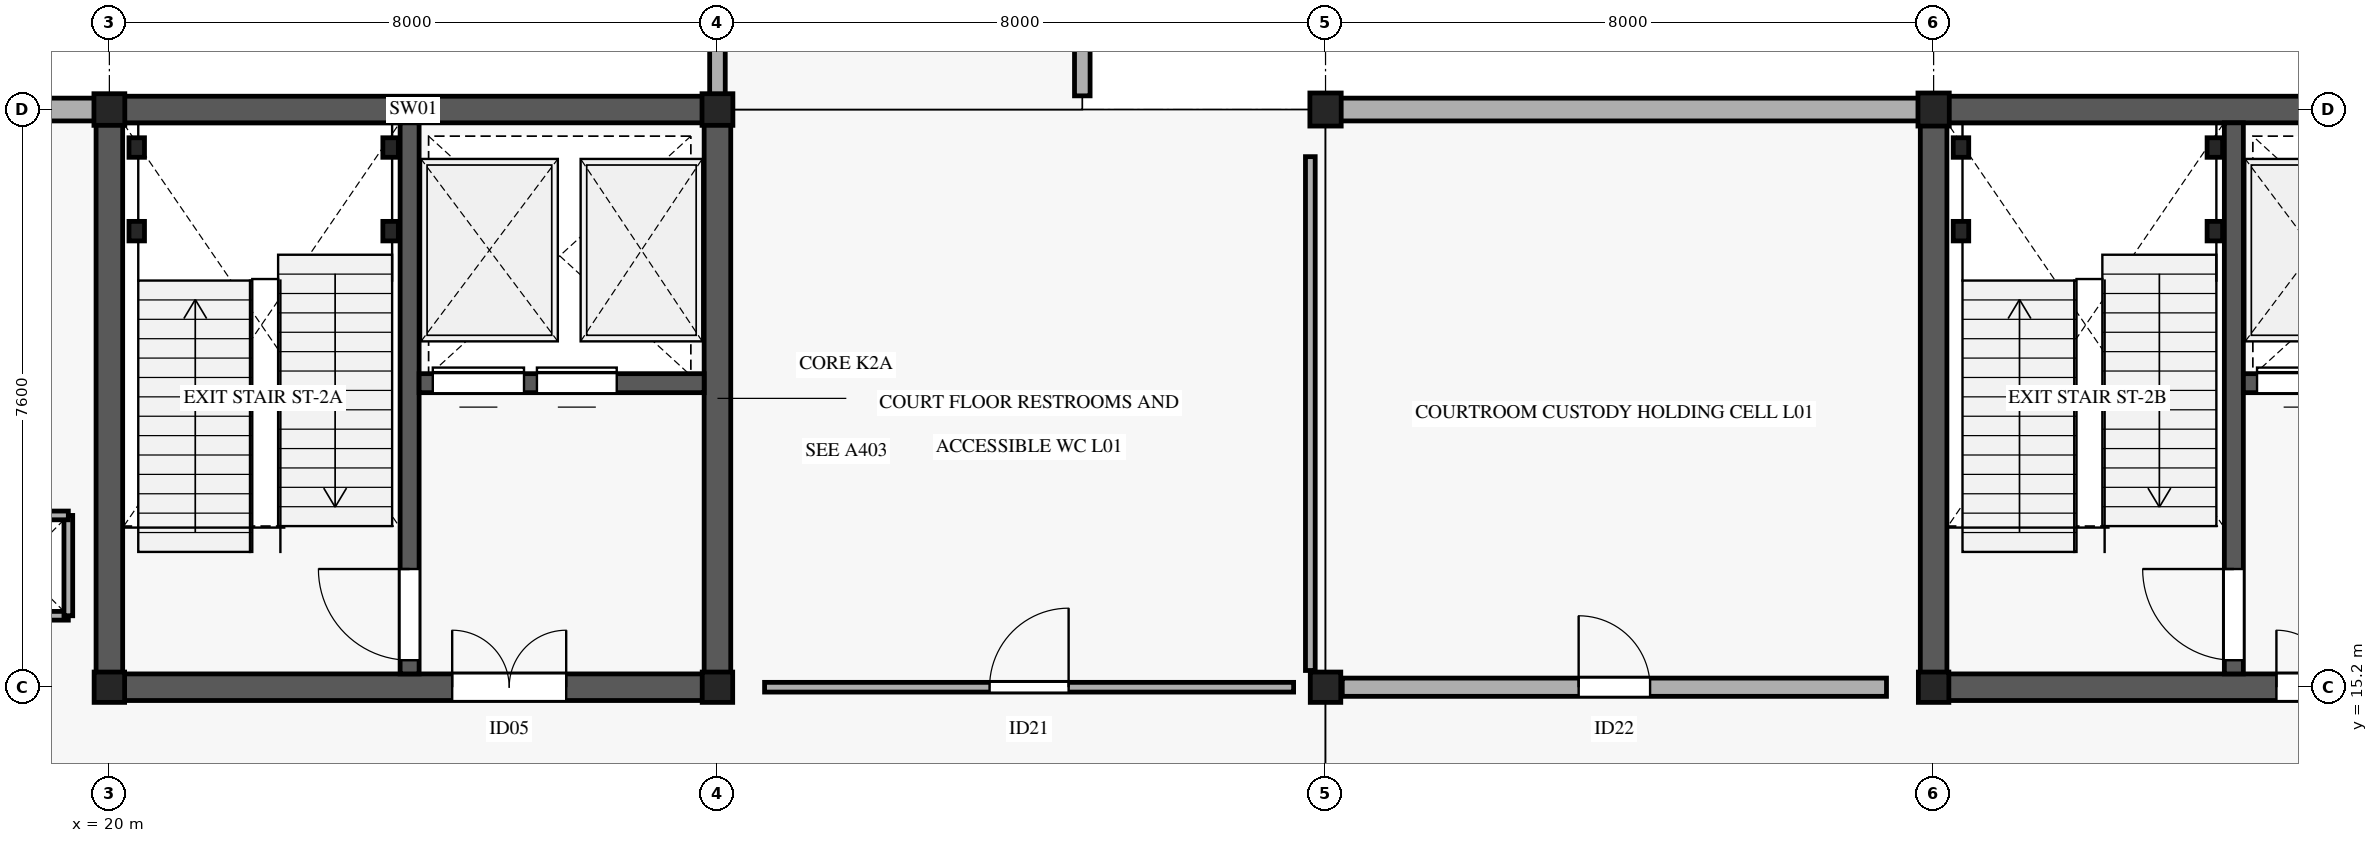
"""IFC4 building model, lengths in metres.
Left out: names, types, materials, properties, quantities, classifications, styles, units other than length and angle.
Written with IfcOpenShell. Run it as: python <this file> out.ifc"""

import sys

from ifc_helpers import new_model, si_unit, direction, frame, frame_2d, origin, origin_2d, place, context, subcontext, project, spatial, rectangle, i_section, extrude, element, fill, save


model = new_model("IFC4")
c1 = context("Model", 3, precision=1e-05, world=origin(), true_north=direction((0.0, 1.0)))
c2 = subcontext(c1, "Body", "Model", "MODEL_VIEW")
j1 = project(units=[si_unit("LENGTHUNIT", "METRE"), si_unit("PLANEANGLEUNIT", "RADIAN")], contexts=[c1])
p1 = place(None, origin())
s1 = spatial("IfcSite", under=j1, at=p1, CompositionType="ELEMENT")
p2 = place(p1, origin())
s2 = spatial("IfcBuilding", under=s1, at=p2, CompositionType="ELEMENT")
p3 = place(p2, frame((0.0, 0.0, 5.4)))
s3 = spatial("IfcBuildingStorey", under=s2, at=p3, CompositionType="ELEMENT", Elevation=5.4)
p4 = place(p3, frame((20.0, 15.2, 0.0), z_axis=(0.0, 0.0, 1.0), x_axis=(1.0, 0.0, 0.0)))
e1 = element("IfcColumn", 1, at=p4, inside=s3, PredefinedType="COLUMN", context=c2, shape_type="SweptSolid", body=[
    extrude(i_section(OverallWidth=0.401, OverallDepth=0.399, WebThickness=0.025, FlangeThickness=0.04, FilletRadius=0.015, at=origin_2d()), origin(), (0.0, 0.0, 1.0), 5.185),
])
p5 = place(p3, frame((20.0, 22.8, 0.0), z_axis=(0.0, 0.0, 1.0), x_axis=(1.0, 0.0, 0.0)))
e2 = element("IfcColumn", 2, at=p5, inside=s3, PredefinedType="COLUMN", context=c2, shape_type="SweptSolid", body=[
    extrude(i_section(OverallWidth=0.406, OverallDepth=0.416, WebThickness=0.03, FlangeThickness=0.048, FilletRadius=0.015, at=origin_2d()), origin(), (0.0, 0.0, 1.0), 5.185),
])
p6 = place(p3, frame((28.0, 15.2, 0.0), z_axis=(0.0, 0.0, 1.0), x_axis=(1.0, 0.0, 0.0)))
e3 = element("IfcColumn", 3, at=p6, inside=s3, PredefinedType="COLUMN", context=c2, shape_type="SweptSolid", body=[
    extrude(i_section(OverallWidth=0.401, OverallDepth=0.399, WebThickness=0.025, FlangeThickness=0.04, FilletRadius=0.015, at=origin_2d()), origin(), (0.0, 0.0, 1.0), 5.185),
])
p7 = place(p3, frame((28.0, 22.8, 0.0), z_axis=(0.0, 0.0, 1.0), x_axis=(1.0, 0.0, 0.0)))
e4 = element("IfcColumn", 4, at=p7, inside=s3, PredefinedType="COLUMN", context=c2, shape_type="SweptSolid", body=[
    extrude(i_section(OverallWidth=0.406, OverallDepth=0.416, WebThickness=0.03, FlangeThickness=0.048, FilletRadius=0.015, at=origin_2d()), origin(), (0.0, 0.0, 1.0), 5.185),
])
p8 = place(p3, frame((36.0, 15.2, 0.0), z_axis=(0.0, 0.0, 1.0), x_axis=(1.0, 0.0, 0.0)))
e5 = element("IfcColumn", 5, at=p8, inside=s3, PredefinedType="COLUMN", context=c2, shape_type="SweptSolid", body=[
    extrude(i_section(OverallWidth=0.401, OverallDepth=0.399, WebThickness=0.025, FlangeThickness=0.04, FilletRadius=0.015, at=origin_2d()), origin(), (0.0, 0.0, 1.0), 5.185),
])
p9 = place(p3, frame((36.0, 22.8, 0.0), z_axis=(0.0, 0.0, 1.0), x_axis=(1.0, 0.0, 0.0)))
e6 = element("IfcColumn", 6, at=p9, inside=s3, PredefinedType="COLUMN", context=c2, shape_type="SweptSolid", body=[
    extrude(i_section(OverallWidth=0.412, OverallDepth=0.435, WebThickness=0.036, FlangeThickness=0.057, FilletRadius=0.015, at=origin_2d()), origin(), (0.0, 0.0, 1.0), 5.185),
])
p10 = place(p3, frame((44.0, 15.2, 0.0), z_axis=(0.0, 0.0, 1.0), x_axis=(1.0, 0.0, 0.0)))
e7 = element("IfcColumn", 7, at=p10, inside=s3, PredefinedType="COLUMN", context=c2, shape_type="SweptSolid", body=[
    extrude(i_section(OverallWidth=0.401, OverallDepth=0.399, WebThickness=0.025, FlangeThickness=0.04, FilletRadius=0.015, at=origin_2d()), origin(), (0.0, 0.0, 1.0), 5.185),
])
p11 = place(p3, frame((44.0, 22.8, 0.0), z_axis=(0.0, 0.0, 1.0), x_axis=(1.0, 0.0, 0.0)))
e8 = element("IfcColumn", 8, at=p11, inside=s3, PredefinedType="COLUMN", context=c2, shape_type="SweptSolid", body=[
    extrude(i_section(OverallWidth=0.412, OverallDepth=0.435, WebThickness=0.036, FlangeThickness=0.057, FilletRadius=0.015, at=origin_2d()), origin(), (0.0, 0.0, 1.0), 5.185),
])
for number, where, z_axis, x_axis in (
    (9, (11.98, 22.8, 0.0), (0.0, 0.0, 1.0), (1.0, 0.0, 0.0)),
    (10, (35.98, 22.8, 0.0), (0.0, 0.0, 1.0), (1.0, 0.0, 0.0)),
):
    element("IfcWall", number, at=place(p3, frame(where, z_axis=z_axis, x_axis=x_axis)), inside=s3, PredefinedType="STANDARD", context=c2, shape_type="SweptSolid", body=[
        extrude(rectangle(XDim=8.04, YDim=0.3, at=frame_2d((4.02, 0.0))), origin(), (0.0, 0.0, 1.0), 4.25),
    ])
p12 = place(p3, frame((28.0, 22.98, 0.0), z_axis=(0.0, 0.0, 1.0), x_axis=(0.0, 1.0, 0.0)))
e11 = element("IfcWall", 11, at=p12, inside=s3, PredefinedType="STANDARD", context=c2, shape_type="SweptSolid", body=[
    extrude(rectangle(XDim=22.84, YDim=0.205, at=frame_2d((11.42, 0.0))), origin(), (0.0, 0.0, 1.0), 4.62),
])
p13 = place(p12, frame((10.195, 0.0, 0.85)))
e12 = element("IfcOpeningElement", 12, at=p13, cuts=e11, PredefinedType="OPENING", context=c2, shape_type="SweptSolid", body=[
    extrude(rectangle(XDim=2.45, YDim=1.55, at=frame_2d((1.225, 0.775))), frame((0.0, 0.113, 0.0), z_axis=(0.0, -1.0, 0.0), x_axis=(1.0, 0.0, 0.0)), (0.0, 0.0, 1.0), 0.225),
])
p14 = place(p3, frame((32.8, 45.82, 0.0), z_axis=(0.0, 0.0, 1.0), x_axis=(0.0, -1.0, 0.0)))
e13 = element("IfcWall", 13, at=p14, inside=s3, PredefinedType="STANDARD", context=c2, shape_type="SweptSolid", body=[
    extrude(rectangle(XDim=22.84, YDim=0.205, at=frame_2d((11.42, 0.0))), origin(), (0.0, 0.0, 1.0), 4.62),
])
p15 = place(p14, frame((10.195, 0.0, 0.85)))
e14 = element("IfcOpeningElement", 14, at=p15, cuts=e13, PredefinedType="OPENING", context=c2, shape_type="SweptSolid", body=[
    extrude(rectangle(XDim=2.45, YDim=1.55, at=frame_2d((1.225, 0.775))), frame((0.0, 0.113, 0.0), z_axis=(0.0, -1.0, 0.0), x_axis=(1.0, 0.0, 0.0)), (0.0, 0.0, 1.0), 0.225),
])
for number, where, z_axis, x_axis in (
    (15, (18.14, 16.14, 0.0), (0.0, 0.0, 1.0), (1.0, 0.0, 0.0)),
    (16, (19.46, 16.14, 0.0), (0.0, 0.0, 1.0), (0.0, 1.0, 0.0)),
    (17, (19.46, 17.46, 0.0), (0.0, 0.0, 1.0), (-1.0, 0.0, 0.0)),
):
    element("IfcWall", number, at=place(p3, frame(where, z_axis=z_axis, x_axis=x_axis)), inside=s3, PredefinedType="PARTITIONING", context=c2, shape_type="SweptSolid", body=[
        extrude(rectangle(XDim=1.32, YDim=0.115, at=frame_2d((0.66, 0.0))), origin(), (0.0, 0.0, 1.0), 4.35),
    ])
p16 = place(p3, frame((19.825, 15.2, 0.0), z_axis=(0.0, 0.0, 1.0), x_axis=(1.0, 0.0, 0.0)))
e18 = element("IfcWall", 18, at=p16, inside=s3, PredefinedType="SHEAR", context=c2, shape_type="SweptSolid", body=[
    extrude(rectangle(XDim=8.35, YDim=0.35, at=frame_2d((4.175, 0.0))), origin(), (0.0, 0.0, 1.0), 5.19),
])
p17 = place(p16, frame((4.685, 0.0, 0.0)))
e19 = element("IfcOpeningElement", 19, at=p17, cuts=e18, PredefinedType="OPENING", context=c2, shape_type="SweptSolid", body=[
    extrude(rectangle(XDim=1.5, YDim=2.2, at=frame_2d((0.75, 1.1))), frame((0.0, 0.185, 0.0), z_axis=(0.0, -1.0, 0.0), x_axis=(1.0, 0.0, 0.0)), (0.0, 0.0, 1.0), 0.37),
])
p18 = place(p3, frame((19.825, 22.8, 0.0), z_axis=(0.0, 0.0, 1.0), x_axis=(1.0, 0.0, 0.0)))
e20 = element("IfcWall", 20, at=p18, inside=s3, PredefinedType="SHEAR", context=c2, shape_type="SweptSolid", body=[
    extrude(rectangle(XDim=8.35, YDim=0.35, at=frame_2d((4.175, 0.0))), origin(), (0.0, 0.0, 1.0), 5.19),
])
for number, where, z_axis, x_axis in (
    (21, (20.0, 15.375, 0.0), (0.0, 0.0, 1.0), (0.0, 1.0, 0.0)),
    (22, (28.0, 15.375, 0.0), (0.0, 0.0, 1.0), (0.0, 1.0, 0.0)),
):
    element("IfcWall", number, at=place(p3, frame(where, z_axis=z_axis, x_axis=x_axis)), inside=s3, PredefinedType="SHEAR", context=c2, shape_type="SweptSolid", body=[
        extrude(rectangle(XDim=7.25, YDim=0.35, at=frame_2d((3.625, 0.0))), origin(), (0.0, 0.0, 1.0), 5.19),
    ])
p19 = place(p3, frame((23.95, 15.375, 0.0), z_axis=(0.0, 0.0, 1.0), x_axis=(0.0, 1.0, 0.0)))
e23 = element("IfcWall", 23, at=p19, inside=s3, PredefinedType="SHEAR", context=c2, shape_type="SweptSolid", body=[
    extrude(rectangle(XDim=7.25, YDim=0.25, at=frame_2d((3.625, 0.0))), origin(), (0.0, 0.0, 1.0), 5.19),
])
p20 = place(p19, frame((0.18, 0.0, 0.0)))
e24 = element("IfcOpeningElement", 24, at=p20, cuts=e23, PredefinedType="OPENING", context=c2, shape_type="SweptSolid", body=[
    extrude(rectangle(XDim=1.2, YDim=2.2, at=frame_2d((0.6, 1.1))), frame((0.0, 0.135, 0.0), z_axis=(0.0, -1.0, 0.0), x_axis=(1.0, 0.0, 0.0)), (0.0, 0.0, 1.0), 0.27),
])
p21 = place(p3, frame((24.075, 19.2, 0.0), z_axis=(0.0, 0.0, 1.0), x_axis=(1.0, 0.0, 0.0)))
e25 = element("IfcWall", 25, at=p21, inside=s3, PredefinedType="SHEAR", context=c2, shape_type="SweptSolid", body=[
    extrude(rectangle(XDim=3.75, YDim=0.25, at=frame_2d((1.875, 0.0))), origin(), (0.0, 0.0, 1.0), 5.19),
])
p22 = place(p21, frame((0.18, 0.0, 0.0)))
e26 = element("IfcOpeningElement", 26, at=p22, cuts=e25, PredefinedType="OPENING", context=c2, shape_type="SweptSolid", body=[
    extrude(rectangle(XDim=1.2, YDim=2.2, at=frame_2d((0.6, 1.1))), frame((0.0, 0.135, 0.0), z_axis=(0.0, -1.0, 0.0), x_axis=(1.0, 0.0, 0.0)), (0.0, 0.0, 1.0), 0.27),
])
p23 = place(p21, frame((1.55, 0.0, 0.0)))
e27 = element("IfcOpeningElement", 27, at=p23, cuts=e25, PredefinedType="OPENING", context=c2, shape_type="SweptSolid", body=[
    extrude(rectangle(XDim=1.05, YDim=2.2, at=frame_2d((0.525, 1.1))), frame((0.0, 0.135, 0.0), z_axis=(0.0, -1.0, 0.0), x_axis=(1.0, 0.0, 0.0)), (0.0, 0.0, 1.0), 0.27),
])
for number, where, z_axis, x_axis in (
    (28, (20.36, 21.2, 0.0), (0.0, 0.0, 1.0), (1.0, 0.0, 0.0)),
    (29, (23.7, 21.2, 0.0), (0.0, 0.0, 1.0), (1.0, 0.0, 0.0)),
    (30, (20.36, 22.3, 0.0), (0.0, 0.0, 1.0), (1.0, 0.0, 0.0)),
    (31, (23.7, 22.3, 0.0), (0.0, 0.0, 1.0), (1.0, 0.0, 0.0)),
):
    element("IfcColumn", number, at=place(p3, frame(where, z_axis=z_axis, x_axis=x_axis)), inside=s3, PredefinedType="COLUMN", context=c2, shape_type="SweptSolid", body=[
        extrude(i_section(OverallWidth=0.204, OverallDepth=0.257, WebThickness=0.009, FlangeThickness=0.016, FilletRadius=0.013, at=origin_2d()), origin(), (0.0, 0.0, 1.0), 5.395),
    ])
p24 = place(p3, frame((43.825, 15.2, 0.0), z_axis=(0.0, 0.0, 1.0), x_axis=(1.0, 0.0, 0.0)))
e32 = element("IfcWall", 32, at=p24, inside=s3, PredefinedType="SHEAR", context=c2, shape_type="SweptSolid", body=[
    extrude(rectangle(XDim=8.35, YDim=0.35, at=frame_2d((4.175, 0.0))), origin(), (0.0, 0.0, 1.0), 5.19),
])
p25 = place(p24, frame((4.685, 0.0, 0.0)))
e33 = element("IfcOpeningElement", 33, at=p25, cuts=e32, PredefinedType="OPENING", context=c2, shape_type="SweptSolid", body=[
    extrude(rectangle(XDim=1.5, YDim=2.2, at=frame_2d((0.75, 1.1))), frame((0.0, 0.185, 0.0), z_axis=(0.0, -1.0, 0.0), x_axis=(1.0, 0.0, 0.0)), (0.0, 0.0, 1.0), 0.37),
])
p26 = place(p3, frame((43.825, 22.8, 0.0), z_axis=(0.0, 0.0, 1.0), x_axis=(1.0, 0.0, 0.0)))
e34 = element("IfcWall", 34, at=p26, inside=s3, PredefinedType="SHEAR", context=c2, shape_type="SweptSolid", body=[
    extrude(rectangle(XDim=8.35, YDim=0.35, at=frame_2d((4.175, 0.0))), origin(), (0.0, 0.0, 1.0), 5.19),
])
p27 = place(p3, frame((44.0, 15.375, 0.0), z_axis=(0.0, 0.0, 1.0), x_axis=(0.0, 1.0, 0.0)))
e35 = element("IfcWall", 35, at=p27, inside=s3, PredefinedType="SHEAR", context=c2, shape_type="SweptSolid", body=[
    extrude(rectangle(XDim=7.25, YDim=0.35, at=frame_2d((3.625, 0.0))), origin(), (0.0, 0.0, 1.0), 5.19),
])
p28 = place(p3, frame((47.95, 15.375, 0.0), z_axis=(0.0, 0.0, 1.0), x_axis=(0.0, 1.0, 0.0)))
e36 = element("IfcWall", 36, at=p28, inside=s3, PredefinedType="SHEAR", context=c2, shape_type="SweptSolid", body=[
    extrude(rectangle(XDim=7.25, YDim=0.25, at=frame_2d((3.625, 0.0))), origin(), (0.0, 0.0, 1.0), 5.19),
])
p29 = place(p28, frame((0.18, 0.0, 0.0)))
e37 = element("IfcOpeningElement", 37, at=p29, cuts=e36, PredefinedType="OPENING", context=c2, shape_type="SweptSolid", body=[
    extrude(rectangle(XDim=1.2, YDim=2.2, at=frame_2d((0.6, 1.1))), frame((0.0, 0.135, 0.0), z_axis=(0.0, -1.0, 0.0), x_axis=(1.0, 0.0, 0.0)), (0.0, 0.0, 1.0), 0.27),
])
p30 = place(p3, frame((48.075, 19.2, 0.0), z_axis=(0.0, 0.0, 1.0), x_axis=(1.0, 0.0, 0.0)))
e38 = element("IfcWall", 38, at=p30, inside=s3, PredefinedType="SHEAR", context=c2, shape_type="SweptSolid", body=[
    extrude(rectangle(XDim=3.75, YDim=0.25, at=frame_2d((1.875, 0.0))), origin(), (0.0, 0.0, 1.0), 5.19),
])
p31 = place(p30, frame((0.18, 0.0, 0.0)))
e39 = element("IfcOpeningElement", 39, at=p31, cuts=e38, PredefinedType="OPENING", context=c2, shape_type="SweptSolid", body=[
    extrude(rectangle(XDim=1.2, YDim=2.2, at=frame_2d((0.6, 1.1))), frame((0.0, 0.135, 0.0), z_axis=(0.0, -1.0, 0.0), x_axis=(1.0, 0.0, 0.0)), (0.0, 0.0, 1.0), 0.27),
])
p32 = place(p30, frame((1.85, 0.0, 0.0)))
e40 = element("IfcOpeningElement", 40, at=p32, cuts=e38, PredefinedType="OPENING", context=c2, shape_type="SweptSolid", body=[
    extrude(rectangle(XDim=1.35, YDim=2.2, at=frame_2d((0.675, 1.1))), frame((0.0, 0.135, 0.0), z_axis=(0.0, -1.0, 0.0), x_axis=(1.0, 0.0, 0.0)), (0.0, 0.0, 1.0), 0.27),
])
for number, where, z_axis, x_axis in (
    (41, (44.36, 21.2, 0.0), (0.0, 0.0, 1.0), (1.0, 0.0, 0.0)),
    (42, (47.7, 21.2, 0.0), (0.0, 0.0, 1.0), (1.0, 0.0, 0.0)),
    (43, (44.36, 22.3, 0.0), (0.0, 0.0, 1.0), (1.0, 0.0, 0.0)),
    (44, (47.7, 22.3, 0.0), (0.0, 0.0, 1.0), (1.0, 0.0, 0.0)),
):
    element("IfcColumn", number, at=place(p3, frame(where, z_axis=z_axis, x_axis=x_axis)), inside=s3, PredefinedType="COLUMN", context=c2, shape_type="SweptSolid", body=[
        extrude(i_section(OverallWidth=0.204, OverallDepth=0.257, WebThickness=0.009, FlangeThickness=0.016, FilletRadius=0.013, at=origin_2d()), origin(), (0.0, 0.0, 1.0), 5.395),
    ])
p33 = place(p3, frame((28.62, 15.2, 0.0), z_axis=(0.0, 0.0, 1.0), x_axis=(1.0, 0.0, 0.0)))
e45 = element("IfcWall", 45, at=p33, inside=s3, PredefinedType="PARTITIONING", context=c2, shape_type="SweptSolid", body=[
    extrude(rectangle(XDim=6.96, YDim=0.128, at=frame_2d((3.48, 0.0))), origin(), (0.0, 0.0, 1.0), 4.05),
])
p34 = place(p33, frame((2.96, 0.0, 0.0)))
e46 = element("IfcOpeningElement", 46, at=p34, cuts=e45, PredefinedType="OPENING", context=c2, shape_type="SweptSolid", body=[
    extrude(rectangle(XDim=1.04, YDim=2.2, at=frame_2d((0.52, 1.1))), frame((0.0, 0.074, 0.0), z_axis=(0.0, -1.0, 0.0), x_axis=(1.0, 0.0, 0.0)), (0.0, 0.0, 1.0), 0.148),
])
p35 = place(p3, frame((35.8, 15.42, 0.0), z_axis=(0.0, 0.0, 1.0), x_axis=(0.0, 1.0, 0.0)))
e47 = element("IfcWall", 47, at=p35, inside=s3, PredefinedType="PARTITIONING", context=c2, shape_type="SweptSolid", body=[
    extrude(rectangle(XDim=6.76, YDim=0.128, at=frame_2d((3.38, 0.0))), origin(), (0.0, 0.0, 1.0), 4.05),
])
p36 = place(p3, frame((36.22, 15.2, 0.0), z_axis=(0.0, 0.0, 1.0), x_axis=(1.0, 0.0, 0.0)))
e48 = element("IfcWall", 48, at=p36, inside=s3, PredefinedType="PARTITIONING", context=c2, shape_type="SweptSolid", body=[
    extrude(rectangle(XDim=7.16, YDim=0.24, at=frame_2d((3.58, 0.0))), origin(), (0.0, 0.0, 1.0), 4.05),
])
p37 = place(p36, frame((3.11, 0.0, 0.0)))
e49 = element("IfcOpeningElement", 49, at=p37, cuts=e48, PredefinedType="OPENING", context=c2, shape_type="SweptSolid", body=[
    extrude(rectangle(XDim=0.94, YDim=2.2, at=frame_2d((0.47, 1.1))), frame((0.0, 0.13, 0.0), z_axis=(0.0, -1.0, 0.0), x_axis=(1.0, 0.0, 0.0)), (0.0, 0.0, 1.0), 0.26),
])
p38 = place(p20, origin())
e50 = element("IfcDoor", 50, at=p38, inside=s3, OperationType="SINGLE_SWING_RIGHT", PredefinedType="DOOR", context=c2, shape_type="SweptSolid", body=[
    extrude(rectangle(XDim=1.2, YDim=2.2, at=frame_2d((0.6, 1.1))), frame((0.0, 0.025, 0.0), z_axis=(0.0, -1.0, 0.0), x_axis=(1.0, 0.0, 0.0)), (0.0, 0.0, 1.0), 0.05),
])
fill(e24, e50)
p39 = place(p17, origin())
e51 = element("IfcDoor", 51, at=p39, inside=s3, OperationType="DOUBLE_DOOR_SINGLE_SWING", PredefinedType="DOOR", context=c2, shape_type="SweptSolid", body=[
    extrude(rectangle(XDim=1.5, YDim=2.2, at=frame_2d((0.75, 1.1))), frame((0.0, 0.025, 0.0), z_axis=(0.0, -1.0, 0.0), x_axis=(1.0, 0.0, 0.0)), (0.0, 0.0, 1.0), 0.05),
])
fill(e19, e51)
p40 = place(p22, origin())
e52 = element("IfcDoor", 52, at=p40, inside=s3, OperationType="SLIDING_TO_LEFT", PredefinedType="DOOR", context=c2, shape_type="SweptSolid", body=[
    extrude(rectangle(XDim=1.2, YDim=2.2, at=frame_2d((0.6, 1.1))), frame((0.0, 0.025, 0.0), z_axis=(0.0, -1.0, 0.0), x_axis=(1.0, 0.0, 0.0)), (0.0, 0.0, 1.0), 0.05),
])
fill(e26, e52)
p41 = place(p23, origin())
e53 = element("IfcDoor", 53, at=p41, inside=s3, OperationType="SLIDING_TO_RIGHT", PredefinedType="DOOR", context=c2, shape_type="SweptSolid", body=[
    extrude(rectangle(XDim=1.05, YDim=2.2, at=frame_2d((0.525, 1.1))), frame((0.0, 0.025, 0.0), z_axis=(0.0, -1.0, 0.0), x_axis=(1.0, 0.0, 0.0)), (0.0, 0.0, 1.0), 0.05),
])
fill(e27, e53)
p42 = place(p29, origin())
e54 = element("IfcDoor", 54, at=p42, inside=s3, OperationType="SINGLE_SWING_RIGHT", PredefinedType="DOOR", context=c2, shape_type="SweptSolid", body=[
    extrude(rectangle(XDim=1.2, YDim=2.2, at=frame_2d((0.6, 1.1))), frame((0.0, 0.025, 0.0), z_axis=(0.0, -1.0, 0.0), x_axis=(1.0, 0.0, 0.0)), (0.0, 0.0, 1.0), 0.05),
])
fill(e37, e54)
p43 = place(p25, origin())
e55 = element("IfcDoor", 55, at=p43, inside=s3, OperationType="DOUBLE_DOOR_SINGLE_SWING", PredefinedType="DOOR", context=c2, shape_type="SweptSolid", body=[
    extrude(rectangle(XDim=1.5, YDim=2.2, at=frame_2d((0.75, 1.1))), frame((0.0, 0.025, 0.0), z_axis=(0.0, -1.0, 0.0), x_axis=(1.0, 0.0, 0.0)), (0.0, 0.0, 1.0), 0.05),
])
fill(e33, e55)
p44 = place(p31, origin())
e56 = element("IfcDoor", 56, at=p44, inside=s3, OperationType="SLIDING_TO_LEFT", PredefinedType="DOOR", context=c2, shape_type="SweptSolid", body=[
    extrude(rectangle(XDim=1.2, YDim=2.2, at=frame_2d((0.6, 1.1))), frame((0.0, 0.025, 0.0), z_axis=(0.0, -1.0, 0.0), x_axis=(1.0, 0.0, 0.0)), (0.0, 0.0, 1.0), 0.05),
])
fill(e39, e56)
p45 = place(p34, origin())
e57 = element("IfcDoor", 57, at=p45, inside=s3, OperationType="SINGLE_SWING_RIGHT", PredefinedType="DOOR", context=c2, shape_type="SweptSolid", body=[
    extrude(rectangle(XDim=1.04, YDim=2.2, at=frame_2d((0.52, 1.1))), frame((0.0, 0.025, 0.0), z_axis=(0.0, -1.0, 0.0), x_axis=(1.0, 0.0, 0.0)), (0.0, 0.0, 1.0), 0.05),
])
fill(e46, e57)
p46 = place(p37, origin())
e58 = element("IfcDoor", 58, at=p46, inside=s3, OperationType="SINGLE_SWING_LEFT", PredefinedType="DOOR", context=c2, shape_type="SweptSolid", body=[
    extrude(rectangle(XDim=0.94, YDim=2.2, at=frame_2d((0.47, 1.1))), frame((0.0, 0.025, 0.0), z_axis=(0.0, -1.0, 0.0), x_axis=(1.0, 0.0, 0.0)), (0.0, 0.0, 1.0), 0.05),
])
fill(e49, e58)
save(model, sys.argv[1])
